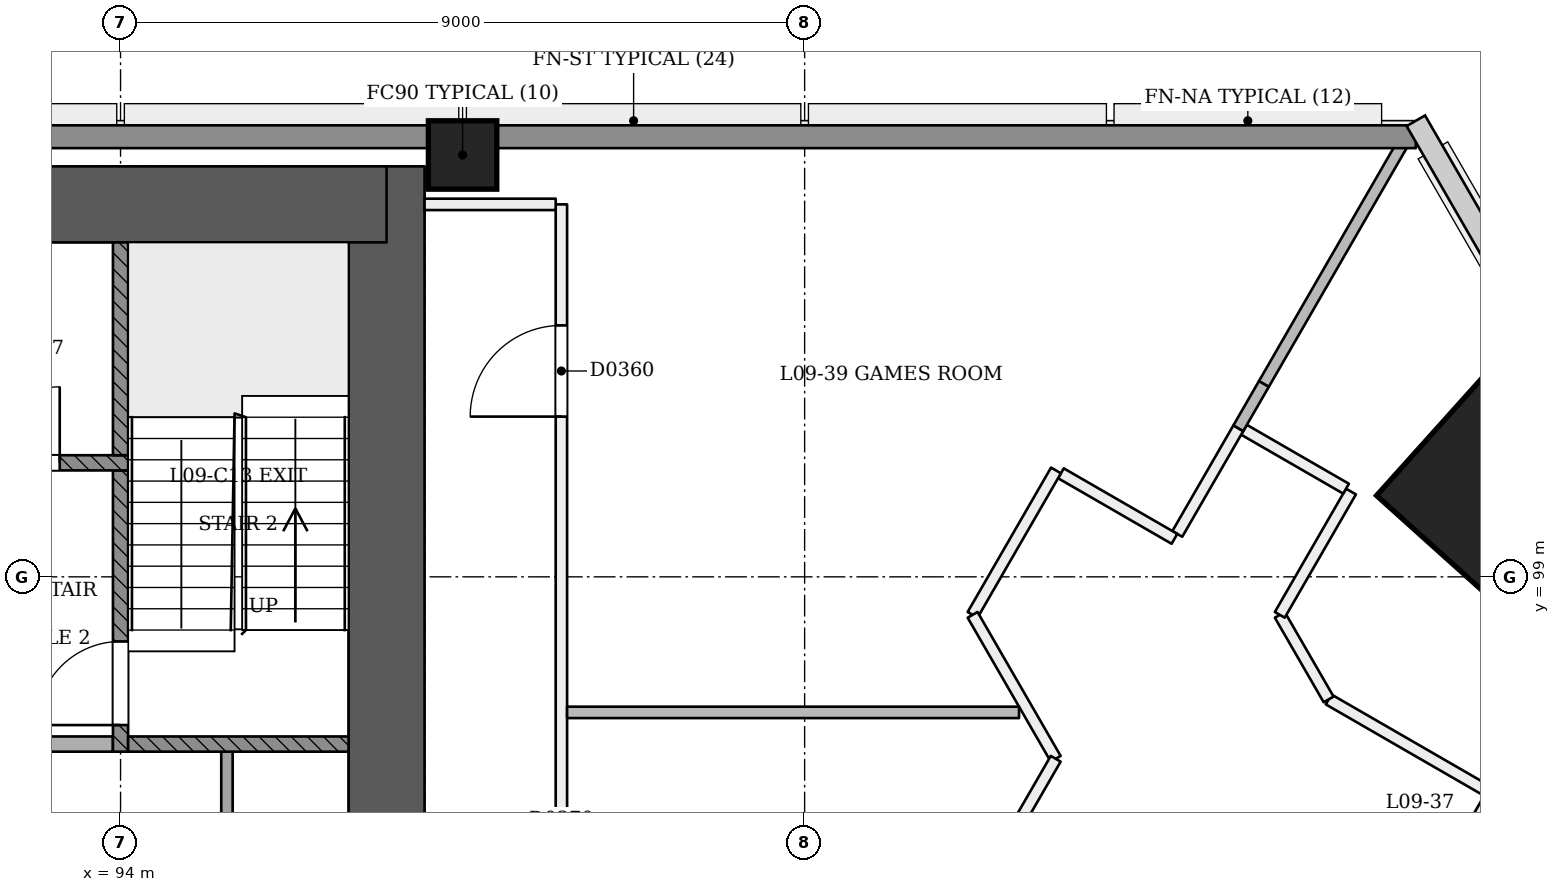
"""IFC4 building model, lengths in metres.
Left out: names, types, materials, properties, quantities, classifications, styles, units other than length and angle.
Written with IfcOpenShell. Run it as: python <this file> out.ifc"""

import sys

from ifc_helpers import new_model, si_unit, direction, frame, frame_2d, origin, origin_2d, place, context, subcontext, project, spatial, rectangle, extrude, element, fill, save


model = new_model("IFC4")
c1 = context("Model", 3, precision=1e-05, world=origin(), true_north=direction((0.0, 1.0)))
c2 = subcontext(c1, "Body", "Model", "MODEL_VIEW")
j1 = project(units=[si_unit("LENGTHUNIT", "METRE"), si_unit("PLANEANGLEUNIT", "RADIAN")], contexts=[c1])
p1 = place(None, origin())
s1 = spatial("IfcSite", under=j1, at=p1, CompositionType="ELEMENT")
p2 = place(p1, origin())
s2 = spatial("IfcBuilding", under=s1, at=p2, CompositionType="ELEMENT")
p3 = place(p2, frame((0.0, 0.0, 41.4)))
s3 = spatial("IfcBuildingStorey", under=s2, at=p3, CompositionType="ELEMENT", Elevation=41.4)
p4 = place(p3, frame((97.5, 92.9, 0.0), z_axis=(0.0, 0.0, 1.0), x_axis=(0.0, 1.0, 0.0)))
e1 = element("IfcWall", 1, at=p4, inside=s3, PredefinedType="SHEAR", context=c2, shape_type="SweptSolid", body=[
    extrude(rectangle(XDim=11.5, YDim=1.0, at=frame_2d((5.75, 0.0))), origin(), (0.0, 0.0, 1.0), 3.6),
])
p5 = place(p3, frame((97.5, 103.9, 0.0), z_axis=(0.0, 0.0, 1.0), x_axis=(-1.0, 0.0, 0.0)))
e2 = element("IfcWall", 2, at=p5, inside=s3, PredefinedType="SHEAR", context=c2, shape_type="SweptSolid", body=[
    extrude(rectangle(XDim=25.5, YDim=1.0, at=frame_2d((12.75, 0.0))), origin(), (0.0, 0.0, 1.0), 3.6),
])
p6 = place(p3, frame((112.338, 100.153, 0.0), z_axis=(-0.028334066552, 0.009286524205, 0.999555371723), x_axis=(0.498272969513, -0.866736541076, 0.022176929837)))
e3 = element("IfcColumn", 3, at=p6, inside=s3, PredefinedType="COLUMN", context=c2, shape_type="SweptSolid", body=[
    extrude(rectangle(XDim=2.52, YDim=2.52, at=origin_2d()), origin(), (0.0, 0.0, 1.0), 3.602),
])
p7 = place(p3, frame((98.5, 104.55, 0.0), z_axis=(0.0, 0.0, 1.0), x_axis=(1.0, 0.0, 0.0)))
e4 = element("IfcColumn", 4, at=p7, inside=s3, PredefinedType="COLUMN", context=c2, shape_type="SweptSolid", body=[
    extrude(rectangle(XDim=0.9, YDim=0.9, at=origin_2d()), origin(), (0.0, 0.0, 1.0), 3.6),
])
p8 = place(p3, frame((111.453, 95.127, 0.0), z_axis=(0.0, 0.0, 1.0), x_axis=(0.499901324955, 0.866082366353, 0.0)))
e5 = element("IfcWall", 5, at=p8, inside=s3, PredefinedType="PARTITIONING", context=c2, shape_type="SweptSolid", body=[
    extrude(rectangle(XDim=1.103, YDim=0.15, at=frame_2d((0.551, 0.0))), origin(), (0.0, 0.0, 1.0), 3.1),
])
p9 = place(p3, frame((112.042, 96.147, 0.0), z_axis=(0.0, 0.0, 1.0), x_axis=(-0.866011868261, 0.500023443481, 0.0)))
e6 = element("IfcWall", 6, at=p9, inside=s3, PredefinedType="PARTITIONING", context=c2, shape_type="SweptSolid", body=[
    extrude(rectangle(XDim=2.481, YDim=0.15, at=frame_2d((1.24, 0.0))), origin(), (0.0, 0.0, 1.0), 2.6),
])
p10 = place(p3, frame((109.894, 97.387, 0.0), z_axis=(0.0, 0.0, 1.0), x_axis=(-0.50006233641, 0.86598941085, 0.0)))
e7 = element("IfcWall", 7, at=p10, inside=s3, PredefinedType="PARTITIONING", context=c2, shape_type="SweptSolid", body=[
    extrude(rectangle(XDim=1.285, YDim=0.15, at=frame_2d((0.643, 0.0))), origin(), (0.0, 0.0, 1.0), 3.1),
])
p11 = place(p3, frame((109.251, 98.5, 0.0), z_axis=(0.0, 0.0, 1.0), x_axis=(0.499951854219, 0.86605319898, 0.0)))
e8 = element("IfcWall", 8, at=p11, inside=s3, PredefinedType="PARTITIONING", context=c2, shape_type="SweptSolid", body=[
    extrude(rectangle(XDim=1.873, YDim=0.15, at=frame_2d((0.937, 0.0))), origin(), (0.0, 0.0, 1.0), 3.1),
])
p12 = place(p3, frame((110.123, 100.16, 0.0), z_axis=(0.0, 0.0, 1.0), x_axis=(-0.865975732936, 0.500086022567, 0.0)))
e9 = element("IfcWall", 9, at=p12, inside=s3, PredefinedType="PARTITIONING", context=c2, shape_type="SweptSolid", body=[
    extrude(rectangle(XDim=1.55, YDim=0.15, at=frame_2d((0.775, 0.0))), origin(), (0.0, 0.0, 1.0), 3.1),
])
p13 = place(p3, frame((99.8, 92.4, 0.0), z_axis=(0.0, 0.0, 1.0), x_axis=(0.0, 1.0, 0.0)))
e10 = element("IfcWall", 10, at=p13, inside=s3, PredefinedType="PARTITIONING", context=c2, shape_type="SweptSolid", body=[
    extrude(rectangle(XDim=11.5, YDim=0.15, at=frame_2d((5.75, 0.0))), origin(), (0.0, 0.0, 1.0), 2.6),
])
p14 = place(p13, frame((8.708, 0.0, 0.0)))
e11 = element("IfcOpeningElement", 11, at=p14, cuts=e10, PredefinedType="OPENING", context=c2, shape_type="SweptSolid", body=[
    extrude(rectangle(XDim=1.2, YDim=2.1, at=frame_2d((0.6, 1.05))), frame((0.0, 0.085, 0.0), z_axis=(0.0, -1.0, 0.0), x_axis=(1.0, 0.0, 0.0)), (0.0, 0.0, 1.0), 0.171),
])
p15 = place(p13, frame((2.096, 0.0, 0.0)))
e12 = element("IfcOpeningElement", 12, at=p15, cuts=e10, PredefinedType="OPENING", context=c2, shape_type="SweptSolid", body=[
    extrude(rectangle(XDim=1.0, YDim=2.1, at=frame_2d((0.5, 1.05))), frame((0.0, 0.085, 0.0), z_axis=(0.0, -1.0, 0.0), x_axis=(1.0, 0.0, 0.0)), (0.0, 0.0, 1.0), 0.171),
])
p16 = place(p3, frame((99.725, 103.9, 0.0), z_axis=(0.0, 0.0, 1.0), x_axis=(-1.0, 0.0, 0.0)))
e13 = element("IfcWall", 13, at=p16, inside=s3, PredefinedType="PARTITIONING", context=c2, shape_type="SweptSolid", body=[
    extrude(rectangle(XDim=1.725, YDim=0.15, at=frame_2d((0.863, 0.0))), origin(), (0.0, 0.0, 1.0), 2.6),
])
p17 = place(p3, frame((108.706, 100.955, 0.0), z_axis=(0.0, 0.0, 1.0), x_axis=(-0.500016533484, -0.866015857963, 0.0)))
e14 = element("IfcWall", 14, at=p17, inside=s3, PredefinedType="PARTITIONING", context=c2, shape_type="SweptSolid", body=[
    extrude(rectangle(XDim=1.605, YDim=0.15, at=frame_2d((0.802, 0.0))), origin(), (0.0, 0.0, 1.0), 3.1),
])
p18 = place(p3, frame((107.865, 99.5, 0.0), z_axis=(0.0, 0.0, 1.0), x_axis=(-0.86597814115, 0.500081852351, 0.0)))
e15 = element("IfcWall", 15, at=p18, inside=s3, PredefinedType="PARTITIONING", context=c2, shape_type="SweptSolid", body=[
    extrude(rectangle(XDim=1.725, YDim=0.15, at=frame_2d((0.862, 0.0))), origin(), (0.0, 0.0, 1.0), 3.1),
])
p19 = place(p3, frame((106.307, 100.4, 0.0), z_axis=(0.0, 0.0, 1.0), x_axis=(-0.500005024956, -0.866022502605, 0.0)))
e16 = element("IfcWall", 16, at=p19, inside=s3, PredefinedType="PARTITIONING", context=c2, shape_type="SweptSolid", body=[
    extrude(rectangle(XDim=2.194, YDim=0.15, at=frame_2d((1.097, 0.0))), origin(), (0.0, 0.0, 1.0), 3.1),
])
p20 = place(p3, frame((105.21, 98.5, 0.0), z_axis=(0.0, 0.0, 1.0), x_axis=(0.500005971936, -0.866021955858, 0.0)))
e17 = element("IfcWall", 17, at=p20, inside=s3, PredefinedType="PARTITIONING", context=c2, shape_type="SweptSolid", body=[
    extrude(rectangle(XDim=2.187, YDim=0.15, at=frame_2d((1.093, 0.0))), origin(), (0.0, 0.0, 1.0), 3.1),
])
p21 = place(p3, frame((106.303, 96.606, 0.0), z_axis=(0.0, 0.0, 1.0), x_axis=(-0.49997190975, -0.866041621091, 0.0)))
e18 = element("IfcWall", 18, at=p21, inside=s3, PredefinedType="PARTITIONING", context=c2, shape_type="SweptSolid", body=[
    extrude(rectangle(XDim=4.857, YDim=0.15, at=frame_2d((2.429, 0.0))), origin(), (0.0, 0.0, 1.0), 3.1),
])
p22 = place(p3, frame((110.983, 104.9, 0.0), z_axis=(0.0, 0.0, 1.0), x_axis=(-0.500000001976, -0.866025402643, 0.0)))
e19 = element("IfcWall", 19, at=p22, inside=s3, PredefinedType="PARTITIONING", context=c2, shape_type="SweptSolid", body=[
    extrude(rectangle(XDim=3.883, YDim=0.15, at=frame_2d((1.942, 0.0))), origin(), (0.0, 0.0, 1.0), 3.1),
])
p23 = place(p3, frame((109.042, 101.537, 0.0), z_axis=(0.0, 0.0, 1.0), x_axis=(-0.500162614387, -0.865931497966, 0.0)))
e20 = element("IfcWall", 20, at=p23, inside=s3, PredefinedType="PARTITIONING", context=c2, shape_type="SweptSolid", body=[
    extrude(rectangle(XDim=0.672, YDim=0.15, at=frame_2d((0.336, 0.0))), origin(), (0.0, 0.0, 1.0), 2.6),
])
p24 = place(p3, frame((99.875, 97.217, 0.0), z_axis=(0.0, 0.0, 1.0), x_axis=(1.0, 0.0, 0.0)))
e21 = element("IfcWall", 21, at=p24, inside=s3, PredefinedType="PARTITIONING", context=c2, shape_type="SweptSolid", body=[
    extrude(rectangle(XDim=5.946, YDim=0.15, at=frame_2d((2.973, 0.0))), origin(), (0.0, 0.0, 1.0), 3.1),
])
p25 = place(p3, frame((58.959, 104.79, 0.0), z_axis=(0.0, 0.0, 1.0), x_axis=(1.0, 0.0, 0.0)))
e22 = element("IfcWall", 22, at=p25, inside=s3, PredefinedType="SOLIDWALL", context=c2, shape_type="SweptSolid", body=[
    extrude(rectangle(XDim=52.082, YDim=0.3, at=frame_2d((26.041, 0.0))), origin(), (0.0, 0.0, 1.0), 2.6),
])
p26 = place(p3, frame((95.4, 93.4, 0.0), z_axis=(0.0, 0.0, 1.0), x_axis=(0.0, 1.0, 0.0)))
e23 = element("IfcWall", 23, at=p26, inside=s3, PredefinedType="PARTITIONING", context=c2, shape_type="SweptSolid", body=[
    extrude(rectangle(XDim=3.3, YDim=0.15, at=frame_2d((1.65, 0.0))), origin(), (0.0, 0.0, 1.0), 3.1),
])
p27 = place(p3, frame((91.5, 96.8, 0.0), z_axis=(0.0, 0.0, 1.0), x_axis=(1.0, 0.0, 0.0)))
e24 = element("IfcWall", 24, at=p27, inside=s3, PredefinedType="PARTITIONING", context=c2, shape_type="SweptSolid", body=[
    extrude(rectangle(XDim=2.4, YDim=0.2, at=frame_2d((1.2, 0.0))), origin(), (0.0, 0.0, 1.0), 3.1),
])
p28 = place(p3, frame((94.0, 96.7, 0.0), z_axis=(0.0, 0.0, 1.0), x_axis=(0.0, 1.0, 0.0)))
e25 = element("IfcWall", 25, at=p28, inside=s3, PredefinedType="SOLIDWALL", context=c2, shape_type="SweptSolid", body=[
    extrude(rectangle(XDim=3.7, YDim=0.2, at=frame_2d((1.85, 0.0))), origin(), (0.0, 0.0, 1.0), 3.1),
])
p29 = place(p28, frame((0.35, 0.0, 0.0)))
e26 = element("IfcOpeningElement", 26, at=p29, cuts=e25, PredefinedType="OPENING", context=c2, shape_type="SweptSolid", body=[
    extrude(rectangle(XDim=1.1, YDim=2.1, at=frame_2d((0.55, 1.05))), frame((0.0, 0.11, 0.0), z_axis=(0.0, -1.0, 0.0), x_axis=(1.0, 0.0, 0.0)), (0.0, 0.0, 1.0), 0.221),
])
p30 = place(p3, frame((94.1, 96.8, 0.0), z_axis=(0.0, 0.0, 1.0), x_axis=(1.0, 0.0, 0.0)))
e27 = element("IfcWall", 27, at=p30, inside=s3, PredefinedType="SOLIDWALL", context=c2, shape_type="SweptSolid", body=[
    extrude(rectangle(XDim=2.9, YDim=0.2, at=frame_2d((1.45, 0.0))), origin(), (0.0, 0.0, 1.0), 3.1),
])
p31 = place(p3, frame((75.9, 100.5, 0.0), z_axis=(0.0, 0.0, 1.0), x_axis=(1.0, 0.0, 0.0)))
e28 = element("IfcWall", 28, at=p31, inside=s3, PredefinedType="SOLIDWALL", context=c2, shape_type="SweptSolid", body=[
    extrude(rectangle(XDim=18.2, YDim=0.2, at=frame_2d((9.1, 0.0))), origin(), (0.0, 0.0, 1.0), 3.1),
])
p32 = place(p31, frame((2.6, 0.0, 0.0)))
e29 = element("IfcOpeningElement", 29, at=p32, cuts=e28, PredefinedType="OPENING", context=c2, shape_type="SweptSolid", body=[
    extrude(rectangle(XDim=1.1, YDim=2.1, at=frame_2d((0.55, 1.05))), frame((0.0, 0.11, 0.0), z_axis=(0.0, -1.0, 0.0), x_axis=(1.0, 0.0, 0.0)), (0.0, 0.0, 1.0), 0.221),
])
p33 = place(p31, frame((4.5, 0.0, 0.0)))
e30 = element("IfcOpeningElement", 30, at=p33, cuts=e28, PredefinedType="OPENING", context=c2, shape_type="SweptSolid", body=[
    extrude(rectangle(XDim=1.1, YDim=2.1, at=frame_2d((0.55, 1.05))), frame((0.0, 0.11, 0.0), z_axis=(0.0, -1.0, 0.0), x_axis=(1.0, 0.0, 0.0)), (0.0, 0.0, 1.0), 0.221),
])
p34 = place(p31, frame((6.4, 0.0, 0.0)))
e31 = element("IfcOpeningElement", 31, at=p34, cuts=e28, PredefinedType="OPENING", context=c2, shape_type="SweptSolid", body=[
    extrude(rectangle(XDim=1.1, YDim=2.1, at=frame_2d((0.55, 1.05))), frame((0.0, 0.11, 0.0), z_axis=(0.0, -1.0, 0.0), x_axis=(1.0, 0.0, 0.0)), (0.0, 0.0, 1.0), 0.221),
])
p35 = place(p31, frame((8.3, 0.0, 0.0)))
e32 = element("IfcOpeningElement", 32, at=p35, cuts=e28, PredefinedType="OPENING", context=c2, shape_type="SweptSolid", body=[
    extrude(rectangle(XDim=1.1, YDim=2.1, at=frame_2d((0.55, 1.05))), frame((0.0, 0.11, 0.0), z_axis=(0.0, -1.0, 0.0), x_axis=(1.0, 0.0, 0.0)), (0.0, 0.0, 1.0), 0.221),
])
p36 = place(p31, frame((10.2, 0.0, 0.0)))
e33 = element("IfcOpeningElement", 33, at=p36, cuts=e28, PredefinedType="OPENING", context=c2, shape_type="SweptSolid", body=[
    extrude(rectangle(XDim=1.1, YDim=2.1, at=frame_2d((0.55, 1.05))), frame((0.0, 0.11, 0.0), z_axis=(0.0, -1.0, 0.0), x_axis=(1.0, 0.0, 0.0)), (0.0, 0.0, 1.0), 0.221),
])
p37 = place(p31, frame((12.1, 0.0, 0.0)))
e34 = element("IfcOpeningElement", 34, at=p37, cuts=e28, PredefinedType="OPENING", context=c2, shape_type="SweptSolid", body=[
    extrude(rectangle(XDim=1.1, YDim=2.1, at=frame_2d((0.55, 1.05))), frame((0.0, 0.11, 0.0), z_axis=(0.0, -1.0, 0.0), x_axis=(1.0, 0.0, 0.0)), (0.0, 0.0, 1.0), 0.221),
])
p38 = place(p31, frame((14.0, 0.0, 0.0)))
e35 = element("IfcOpeningElement", 35, at=p38, cuts=e28, PredefinedType="OPENING", context=c2, shape_type="SweptSolid", body=[
    extrude(rectangle(XDim=1.1, YDim=2.1, at=frame_2d((0.55, 1.05))), frame((0.0, 0.11, 0.0), z_axis=(0.0, -1.0, 0.0), x_axis=(1.0, 0.0, 0.0)), (0.0, 0.0, 1.0), 0.221),
])
p39 = place(p31, frame((0.65, 0.0, 0.0)))
e36 = element("IfcOpeningElement", 36, at=p39, cuts=e28, PredefinedType="OPENING", context=c2, shape_type="SweptSolid", body=[
    extrude(rectangle(XDim=1.0, YDim=2.1, at=frame_2d((0.5, 1.05))), frame((0.0, 0.11, 0.0), z_axis=(0.0, -1.0, 0.0), x_axis=(1.0, 0.0, 0.0)), (0.0, 0.0, 1.0), 0.221),
])
p40 = place(p31, frame((16.3, 0.0, 0.0)))
e37 = element("IfcOpeningElement", 37, at=p40, cuts=e28, PredefinedType="OPENING", context=c2, shape_type="SweptSolid", body=[
    extrude(rectangle(XDim=1.0, YDim=2.1, at=frame_2d((0.5, 1.05))), frame((0.0, 0.11, 0.0), z_axis=(0.0, -1.0, 0.0), x_axis=(1.0, 0.0, 0.0)), (0.0, 0.0, 1.0), 0.221),
])
p41 = place(p3, frame((94.0, 100.6, 0.0), z_axis=(0.0, 0.0, 1.0), x_axis=(0.0, 1.0, 0.0)))
e38 = element("IfcWall", 38, at=p41, inside=s3, PredefinedType="SOLIDWALL", context=c2, shape_type="SweptSolid", body=[
    extrude(rectangle(XDim=2.8, YDim=0.2, at=frame_2d((1.4, 0.0))), origin(), (0.0, 0.0, 1.0), 3.1),
])
p42 = place(p14, origin())
e39 = element("IfcDoor", 39, at=p42, inside=s3, OperationType="SINGLE_SWING_LEFT", PredefinedType="NOTDEFINED", context=c2, shape_type="SweptSolid", body=[
    extrude(rectangle(XDim=1.2, YDim=2.1, at=frame_2d((0.6, 1.05))), frame((0.0, 0.025, 0.0), z_axis=(0.0, -1.0, 0.0), x_axis=(1.0, 0.0, 0.0)), (0.0, 0.0, 1.0), 0.05),
])
fill(e11, e39)
p43 = place(p29, origin())
e40 = element("IfcDoor", 40, at=p43, inside=s3, OperationType="SINGLE_SWING_LEFT", PredefinedType="NOTDEFINED", context=c2, shape_type="SweptSolid", body=[
    extrude(rectangle(XDim=1.1, YDim=2.1, at=frame_2d((0.55, 1.05))), frame((0.0, 0.025, 0.0), z_axis=(0.0, -1.0, 0.0), x_axis=(1.0, 0.0, 0.0)), (0.0, 0.0, 1.0), 0.05),
])
fill(e26, e40)
p44 = place(p40, origin())
e41 = element("IfcDoor", 41, at=p44, inside=s3, OperationType="SINGLE_SWING_RIGHT", PredefinedType="NOTDEFINED", context=c2, shape_type="SweptSolid", body=[
    extrude(rectangle(XDim=1.0, YDim=2.1, at=frame_2d((0.5, 1.05))), frame((0.0, 0.025, 0.0), z_axis=(0.0, -1.0, 0.0), x_axis=(1.0, 0.0, 0.0)), (0.0, 0.0, 1.0), 0.05),
])
fill(e37, e41)
save(model, sys.argv[1])
